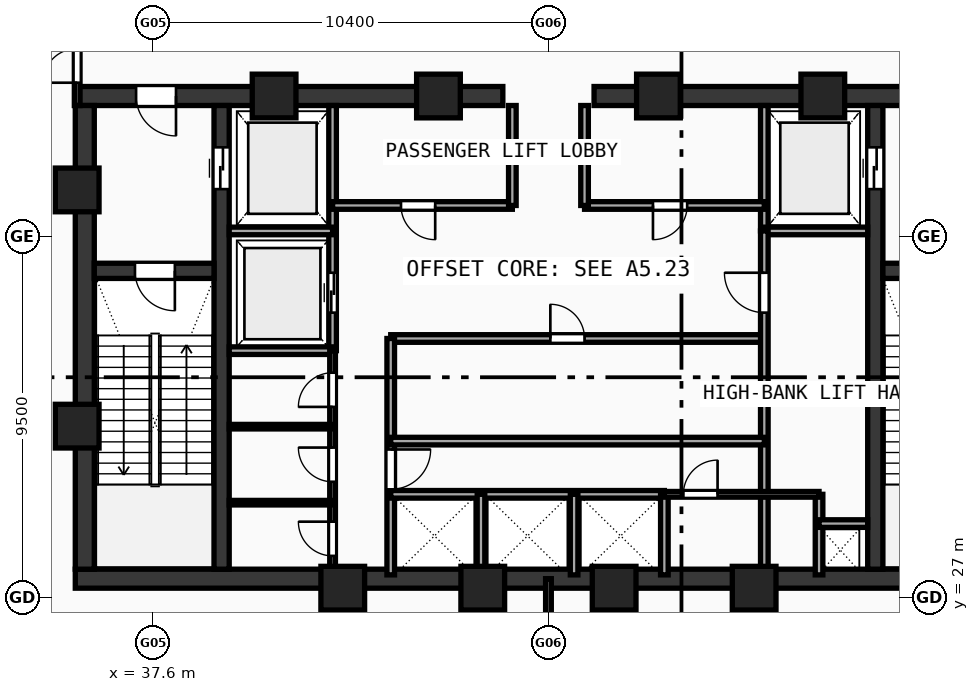
"""IFC4 building model, lengths in metres.
Left out: names, types, materials, properties, quantities, classifications, styles, units other than length and angle.
Written with IfcOpenShell. Run it as: python <this file> out.ifc"""

import sys

from ifc_helpers import new_model, si_unit, direction, frame, frame_2d, origin, origin_with_axes, origin_2d, place, context, subcontext, project, spatial, rectangle, hollow_rectangle, extrude, source, transform, mapped, element, fill, save


model = new_model("IFC4")
c1 = context("Model", 3, precision=1e-05, world=origin(), true_north=direction((0.0, 1.0)))
c2 = subcontext(c1, "Body", "Model", "MODEL_VIEW")
j1 = project(units=[si_unit("LENGTHUNIT", "METRE"), si_unit("PLANEANGLEUNIT", "RADIAN")], contexts=[c1])
p1 = place(None, origin())
s1 = spatial("IfcSite", under=j1, at=p1, CompositionType="ELEMENT")
p2 = place(p1, origin())
s2 = spatial("IfcBuilding", under=s1, at=p2, CompositionType="ELEMENT")
p3 = place(p2, frame((0.0, 0.0, 371.76)))
s3 = spatial("IfcBuildingStorey", under=s2, at=p3, CompositionType="ELEMENT", Elevation=371.76)
p4 = place(p3, frame((35.55, 27.5, 0.0), z_axis=(0.0, 0.0, 1.0), x_axis=(1.0, 0.0, 0.0)))
e1 = element("IfcWall", 1, at=p4, inside=s3, PredefinedType="SHEAR", context=c2, shape_type="SweptSolid", body=[
    extrude(rectangle(XDim=24.9, YDim=0.5, at=frame_2d((12.45, 0.0))), origin(), (0.0, 0.0, 1.0), 4.72),
])
p5 = place(p3, frame((35.55, 40.2, 0.0), z_axis=(0.0, 0.0, 1.0), x_axis=(1.0, 0.0, 0.0)))
e2 = element("IfcWall", 2, at=p5, inside=s3, PredefinedType="SHEAR", context=c2, shape_type="SweptSolid", body=[
    extrude(rectangle(XDim=11.25, YDim=0.5, at=frame_2d((5.625, 0.0))), origin(), (0.0, 0.0, 1.0), 4.72),
])
p6 = place(p5, frame((1.6, 0.0, 0.0)))
e3 = element("IfcOpeningElement", 3, at=p6, cuts=e2, PredefinedType="OPENING", context=c2, shape_type="SweptSolid", body=[
    extrude(rectangle(XDim=1.05, YDim=2.1, at=frame_2d((0.525, 1.05))), frame((0.0, 0.26, 0.0), z_axis=(0.0, -1.0, 0.0), x_axis=(1.0, 0.0, 0.0)), (0.0, 0.0, 1.0), 0.52),
])
p7 = place(p3, frame((49.2, 40.2, 0.0), z_axis=(0.0, 0.0, 1.0), x_axis=(1.0, 0.0, 0.0)))
e4 = element("IfcWall", 4, at=p7, inside=s3, PredefinedType="SHEAR", context=c2, shape_type="SweptSolid", body=[
    extrude(rectangle(XDim=11.25, YDim=0.5, at=frame_2d((5.625, 0.0))), origin(), (0.0, 0.0, 1.0), 4.72),
])
p8 = place(p7, frame((8.6, 0.0, 0.0)))
e5 = element("IfcOpeningElement", 5, at=p8, cuts=e4, PredefinedType="OPENING", context=c2, shape_type="SweptSolid", body=[
    extrude(rectangle(XDim=1.05, YDim=2.1, at=frame_2d((0.525, 1.05))), frame((0.0, 0.26, 0.0), z_axis=(0.0, -1.0, 0.0), x_axis=(1.0, 0.0, 0.0)), (0.0, 0.0, 1.0), 0.52),
])
p9 = place(p3, frame((35.8, 27.75, 0.0), z_axis=(0.0, 0.0, 1.0), x_axis=(0.0, 1.0, 0.0)))
e6 = element("IfcWall", 6, at=p9, inside=s3, PredefinedType="SHEAR", context=c2, shape_type="SweptSolid", body=[
    extrude(rectangle(XDim=12.2, YDim=0.5, at=frame_2d((6.1, 0.0))), origin(), (0.0, 0.0, 1.0), 4.72),
])
p10 = place(p3, frame((39.4, 27.75, 0.0), z_axis=(0.0, 0.0, 1.0), x_axis=(0.0, 1.0, 0.0)))
e7 = element("IfcWall", 7, at=p10, inside=s3, PredefinedType="SHEAR", context=c2, shape_type="SweptSolid", body=[
    extrude(rectangle(XDim=12.2, YDim=0.4, at=frame_2d((6.1, 0.0))), origin(), (0.0, 0.0, 1.0), 4.72),
])
p11 = place(p10, frame((10.0, 0.0, 0.0)))
e8 = element("IfcOpeningElement", 8, at=p11, cuts=e7, PredefinedType="OPENING", context=c2, shape_type="SweptSolid", body=[
    extrude(rectangle(XDim=1.1, YDim=2.1, at=frame_2d((0.55, 1.05))), frame((0.0, 0.21, 0.0), z_axis=(0.0, -1.0, 0.0), x_axis=(1.0, 0.0, 0.0)), (0.0, 0.0, 1.0), 0.42),
])
p12 = place(p3, frame((56.6, 27.75, 0.0), z_axis=(0.0, 0.0, 1.0), x_axis=(0.0, 1.0, 0.0)))
e9 = element("IfcWall", 9, at=p12, inside=s3, PredefinedType="SHEAR", context=c2, shape_type="SweptSolid", body=[
    extrude(rectangle(XDim=12.2, YDim=0.4, at=frame_2d((6.1, 0.0))), origin(), (0.0, 0.0, 1.0), 4.72),
])
p13 = place(p12, frame((10.0, 0.0, 0.0)))
e10 = element("IfcOpeningElement", 10, at=p13, cuts=e9, PredefinedType="OPENING", context=c2, shape_type="SweptSolid", body=[
    extrude(rectangle(XDim=1.1, YDim=2.1, at=frame_2d((0.55, 1.05))), frame((0.0, 0.21, 0.0), z_axis=(0.0, -1.0, 0.0), x_axis=(1.0, 0.0, 0.0)), (0.0, 0.0, 1.0), 0.42),
])
p14 = place(p3, frame((36.05, 35.6, 0.0), z_axis=(0.0, 0.0, 1.0), x_axis=(1.0, 0.0, 0.0)))
e11 = element("IfcWall", 11, at=p14, inside=s3, PredefinedType="SHEAR", context=c2, shape_type="SweptSolid", body=[
    extrude(rectangle(XDim=3.15, YDim=0.4, at=frame_2d((1.575, 0.0))), origin(), (0.0, 0.0, 1.0), 4.72),
])
p15 = place(p14, frame((1.07, 0.0, 0.0)))
e12 = element("IfcOpeningElement", 12, at=p15, cuts=e11, PredefinedType="OPENING", context=c2, shape_type="SweptSolid", body=[
    extrude(rectangle(XDim=1.05, YDim=2.1, at=frame_2d((0.525, 1.05))), frame((0.0, 0.21, 0.0), z_axis=(0.0, -1.0, 0.0), x_axis=(1.0, 0.0, 0.0)), (0.0, 0.0, 1.0), 0.42),
])
p16 = place(p3, frame((56.8, 35.6, 0.0), z_axis=(0.0, 0.0, 1.0), x_axis=(1.0, 0.0, 0.0)))
e13 = element("IfcWall", 13, at=p16, inside=s3, PredefinedType="SHEAR", context=c2, shape_type="SweptSolid", body=[
    extrude(rectangle(XDim=3.15, YDim=0.4, at=frame_2d((1.575, 0.0))), origin(), (0.0, 0.0, 1.0), 4.72),
])
p17 = place(p16, frame((1.02, 0.0, 0.0)))
e14 = element("IfcOpeningElement", 14, at=p17, cuts=e13, PredefinedType="OPENING", context=c2, shape_type="SweptSolid", body=[
    extrude(rectangle(XDim=1.05, YDim=2.1, at=frame_2d((0.525, 1.05))), frame((0.0, 0.21, 0.0), z_axis=(0.0, -1.0, 0.0), x_axis=(1.0, 0.0, 0.0)), (0.0, 0.0, 1.0), 0.42),
])
m1 = source(origin(), c2, "Body", "SweptSolid", [
    extrude(hollow_rectangle(XDim=1.15, YDim=1.15, WallThickness=0.048, at=origin_2d()), origin(), (0.0, 0.0, 1.0), 5.0),
])
for number, where, z_axis, x_axis in (
    (15, (42.588, 27.25, -0.28), (0.0, 0.0, 1.0), (1.0, 0.0, 0.0)),
    (16, (46.272, 27.25, -0.28), (0.0, 0.0, 1.0), (1.0, 0.0, 0.0)),
    (17, (49.729, 27.25, -0.28), (0.0, 0.0, 1.0), (1.0, 0.0, 0.0)),
    (18, (53.412, 27.25, -0.28), (0.0, 0.0, 1.0), (1.0, 0.0, 0.0)),
    (19, (55.219, 40.2, -0.28), (0.0, 0.0, 1.0), (1.0, 0.0, 0.0)),
    (20, (50.894, 40.2, -0.28), (0.0, 0.0, 1.0), (1.0, 0.0, 0.0)),
    (21, (45.106, 40.2, -0.28), (0.0, 0.0, 1.0), (1.0, 0.0, 0.0)),
    (22, (40.781, 40.2, -0.28), (0.0, 0.0, 1.0), (1.0, 0.0, 0.0)),
    (23, (35.6, 37.729, -0.28), (0.0, 0.0, 1.0), (1.0, 0.0, 0.0)),
    (24, (35.6, 31.513, -0.28), (0.0, 0.0, 1.0), (1.0, 0.0, 0.0)),
):
    element("IfcColumn", number, at=place(p3, frame(where, z_axis=z_axis, x_axis=x_axis)), inside=s3, PredefinedType="COLUMN", context=c2, shape_type="MappedRepresentation", body=[
        mapped(m1, transform((0.0, 0.0, 0.0), scale=1.0)),
    ])
p18 = place(p3, frame((42.32, 33.5, 0.0), z_axis=(0.0, 0.0, 1.0), x_axis=(0.0, 1.0, 0.0)))
e25 = element("IfcWall", 25, at=p18, inside=s3, PredefinedType="SOLIDWALL", context=c2, shape_type="SweptSolid", body=[
    extrude(rectangle(XDim=6.45, YDim=0.2, at=frame_2d((3.225, 0.0))), origin(), (0.0, 0.0, 1.0), 4.72),
])
p19 = place(p18, frame((1.0, 0.0, 0.0)))
e26 = element("IfcOpeningElement", 26, at=p19, cuts=e25, PredefinedType="OPENING", context=c2, shape_type="SweptSolid", body=[
    extrude(rectangle(XDim=1.05, YDim=2.1, at=frame_2d((0.525, 1.05))), frame((0.0, 0.11, 0.0), z_axis=(0.0, -1.0, 0.0), x_axis=(1.0, 0.0, 0.0)), (0.0, 0.0, 1.0), 0.22),
])
for number, where, z_axis, x_axis in (
    (27, (39.6, 36.65, 0.0), (0.0, 0.0, 1.0), (1.0, 0.0, 0.0)),
    (28, (39.6, 33.5, 0.0), (0.0, 0.0, 1.0), (1.0, 0.0, 0.0)),
):
    element("IfcWall", number, at=place(p3, frame(where, z_axis=z_axis, x_axis=x_axis)), inside=s3, PredefinedType="SOLIDWALL", context=c2, shape_type="SweptSolid", body=[
        extrude(rectangle(XDim=2.72, YDim=0.2, at=frame_2d((1.36, 0.0))), origin(), (0.0, 0.0, 1.0), 4.72),
    ])
p20 = place(p3, frame((53.68, 36.65, 0.0), z_axis=(0.0, 0.0, 1.0), x_axis=(0.0, 1.0, 0.0)))
e29 = element("IfcWall", 29, at=p20, inside=s3, PredefinedType="SOLIDWALL", context=c2, shape_type="SweptSolid", body=[
    extrude(rectangle(XDim=3.3, YDim=0.2, at=frame_2d((1.65, 0.0))), origin(), (0.0, 0.0, 1.0), 4.72),
])
p21 = place(p3, frame((53.68, 36.65, 0.0), z_axis=(0.0, 0.0, 1.0), x_axis=(1.0, 0.0, 0.0)))
e30 = element("IfcWall", 30, at=p21, inside=s3, PredefinedType="SOLIDWALL", context=c2, shape_type="SweptSolid", body=[
    extrude(rectangle(XDim=2.72, YDim=0.2, at=frame_2d((1.36, 0.0))), origin(), (0.0, 0.0, 1.0), 4.72),
])
p22 = place(p3, frame((42.32, 37.32, 0.0), z_axis=(0.0, 0.0, 1.0), x_axis=(1.0, 0.0, 0.0)))
e31 = element("IfcWall", 31, at=p22, inside=s3, PredefinedType="SOLIDWALL", context=c2, shape_type="SweptSolid", body=[
    extrude(rectangle(XDim=4.73, YDim=0.2, at=frame_2d((2.365, 0.0))), origin(), (0.0, 0.0, 1.0), 4.72),
])
p23 = place(p22, frame((1.8, 0.0, 0.0)))
e32 = element("IfcOpeningElement", 32, at=p23, cuts=e31, PredefinedType="OPENING", context=c2, shape_type="SweptSolid", body=[
    extrude(rectangle(XDim=0.9, YDim=2.1, at=frame_2d((0.45, 1.05))), frame((0.0, 0.11, 0.0), z_axis=(0.0, -1.0, 0.0), x_axis=(1.0, 0.0, 0.0)), (0.0, 0.0, 1.0), 0.22),
])
p24 = place(p3, frame((48.95, 37.32, 0.0), z_axis=(0.0, 0.0, 1.0), x_axis=(1.0, 0.0, 0.0)))
e33 = element("IfcWall", 33, at=p24, inside=s3, PredefinedType="SOLIDWALL", context=c2, shape_type="SweptSolid", body=[
    extrude(rectangle(XDim=4.73, YDim=0.2, at=frame_2d((2.365, 0.0))), origin(), (0.0, 0.0, 1.0), 4.72),
])
p25 = place(p24, frame((1.8, 0.0, 0.0)))
e34 = element("IfcOpeningElement", 34, at=p25, cuts=e33, PredefinedType="OPENING", context=c2, shape_type="SweptSolid", body=[
    extrude(rectangle(XDim=0.9, YDim=2.1, at=frame_2d((0.45, 1.05))), frame((0.0, 0.11, 0.0), z_axis=(0.0, -1.0, 0.0), x_axis=(1.0, 0.0, 0.0)), (0.0, 0.0, 1.0), 0.22),
])
for number, where, z_axis, x_axis in (
    (35, (47.05, 37.32, 0.0), (0.0, 0.0, 1.0), (0.0, 1.0, 0.0)),
    (36, (48.95, 37.32, 0.0), (0.0, 0.0, 1.0), (0.0, 1.0, 0.0)),
):
    element("IfcWall", number, at=place(p3, frame(where, z_axis=z_axis, x_axis=x_axis)), inside=s3, PredefinedType="SOLIDWALL", context=c2, shape_type="SweptSolid", body=[
        extrude(rectangle(XDim=2.63, YDim=0.2, at=frame_2d((1.315, 0.0))), origin(), (0.0, 0.0, 1.0), 4.72),
    ])
p26 = place(p3, frame((43.85, 33.82, 0.0), z_axis=(0.0, 0.0, 1.0), x_axis=(1.0, 0.0, 0.0)))
e37 = element("IfcWall", 37, at=p26, inside=s3, PredefinedType="SOLIDWALL", context=c2, shape_type="SweptSolid", body=[
    extrude(rectangle(XDim=9.83, YDim=0.2, at=frame_2d((4.915, 0.0))), origin(), (0.0, 0.0, 1.0), 4.72),
])
p27 = place(p26, frame((4.2, 0.0, 0.0)))
e38 = element("IfcOpeningElement", 38, at=p27, cuts=e37, PredefinedType="OPENING", context=c2, shape_type="SweptSolid", body=[
    extrude(rectangle(XDim=0.9, YDim=2.1, at=frame_2d((0.45, 1.05))), frame((0.0, 0.11, 0.0), z_axis=(0.0, -1.0, 0.0), x_axis=(1.0, 0.0, 0.0)), (0.0, 0.0, 1.0), 0.22),
])
p28 = place(p3, frame((43.85, 27.6, 0.0), z_axis=(0.0, 0.0, 1.0), x_axis=(0.0, 1.0, 0.0)))
e39 = element("IfcWall", 39, at=p28, inside=s3, PredefinedType="SOLIDWALL", context=c2, shape_type="SweptSolid", body=[
    extrude(rectangle(XDim=6.22, YDim=0.2, at=frame_2d((3.11, 0.0))), origin(), (0.0, 0.0, 1.0), 4.72),
])
p29 = place(p28, frame((2.25, 0.0, 0.0)))
e40 = element("IfcOpeningElement", 40, at=p29, cuts=e39, PredefinedType="OPENING", context=c2, shape_type="SweptSolid", body=[
    extrude(rectangle(XDim=1.05, YDim=2.1, at=frame_2d((0.525, 1.05))), frame((0.0, 0.11, 0.0), z_axis=(0.0, -1.0, 0.0), x_axis=(1.0, 0.0, 0.0)), (0.0, 0.0, 1.0), 0.22),
])
p30 = place(p3, frame((53.68, 27.6, 0.0), z_axis=(0.0, 0.0, 1.0), x_axis=(0.0, 1.0, 0.0)))
e41 = element("IfcWall", 41, at=p30, inside=s3, PredefinedType="SOLIDWALL", context=c2, shape_type="SweptSolid", body=[
    extrude(rectangle(XDim=9.05, YDim=0.2, at=frame_2d((4.525, 0.0))), origin(), (0.0, 0.0, 1.0), 4.72),
])
p31 = place(p30, frame((6.9, 0.0, 0.0)))
e42 = element("IfcOpeningElement", 42, at=p31, cuts=e41, PredefinedType="OPENING", context=c2, shape_type="SweptSolid", body=[
    extrude(rectangle(XDim=1.05, YDim=2.1, at=frame_2d((0.525, 1.05))), frame((0.0, 0.11, 0.0), z_axis=(0.0, -1.0, 0.0), x_axis=(1.0, 0.0, 0.0)), (0.0, 0.0, 1.0), 0.22),
])
p32 = place(p3, frame((43.85, 29.72, 0.0), z_axis=(0.0, 0.0, 1.0), x_axis=(1.0, 0.0, 0.0)))
e43 = element("IfcWall", 43, at=p32, inside=s3, PredefinedType="SOLIDWALL", context=c2, shape_type="SweptSolid", body=[
    extrude(rectangle(XDim=7.2, YDim=0.2, at=frame_2d((3.6, 0.0))), origin(), (0.0, 0.0, 1.0), 4.72),
])
p33 = place(p3, frame((51.05, 27.6, 0.0), z_axis=(0.0, 0.0, 1.0), x_axis=(0.0, 1.0, 0.0)))
e44 = element("IfcWall", 44, at=p33, inside=s3, PredefinedType="SOLIDWALL", context=c2, shape_type="SweptSolid", body=[
    extrude(rectangle(XDim=2.12, YDim=0.2, at=frame_2d((1.06, 0.0))), origin(), (0.0, 0.0, 1.0), 4.72),
])
p34 = place(p3, frame((43.85, 31.12, 0.0), z_axis=(0.0, 0.0, 1.0), x_axis=(1.0, 0.0, 0.0)))
e45 = element("IfcWall", 45, at=p34, inside=s3, PredefinedType="SOLIDWALL", context=c2, shape_type="SweptSolid", body=[
    extrude(rectangle(XDim=9.83, YDim=0.2, at=frame_2d((4.915, 0.0))), origin(), (0.0, 0.0, 1.0), 4.72),
])
for number, where, z_axis, x_axis in (
    (46, (46.225, 27.6, 0.0), (0.0, 0.0, 1.0), (0.0, 1.0, 0.0)),
    (47, (48.675, 27.6, 0.0), (0.0, 0.0, 1.0), (0.0, 1.0, 0.0)),
    (48, (55.12, 27.6, 0.0), (0.0, 0.0, 1.0), (0.0, 1.0, 0.0)),
):
    element("IfcWall", number, at=place(p3, frame(where, z_axis=z_axis, x_axis=x_axis)), inside=s3, PredefinedType="SOLIDWALL", context=c2, shape_type="SweptSolid", body=[
        extrude(rectangle(XDim=2.12, YDim=0.2, at=frame_2d((1.06, 0.0))), origin(), (0.0, 0.0, 1.0), 4.72),
    ])
p35 = place(p3, frame((55.12, 28.95, 0.0), z_axis=(0.0, 0.0, 1.0), x_axis=(1.0, 0.0, 0.0)))
e49 = element("IfcWall", 49, at=p35, inside=s3, PredefinedType="SOLIDWALL", context=c2, shape_type="SweptSolid", body=[
    extrude(rectangle(XDim=1.28, YDim=0.2, at=frame_2d((0.64, 0.0))), origin(), (0.0, 0.0, 1.0), 4.72),
])
p36 = place(p3, frame((42.32, 27.6, 0.0), z_axis=(0.0, 0.0, 1.0), x_axis=(0.0, 1.0, 0.0)))
e50 = element("IfcWall", 50, at=p36, inside=s3, PredefinedType="PARTITIONING", context=c2, shape_type="SweptSolid", body=[
    extrude(rectangle(XDim=5.9, YDim=0.15, at=frame_2d((2.95, 0.0))), origin(), (0.0, 0.0, 1.0), 4.72),
])
p37 = place(p36, frame((0.5, 0.0, 0.0)))
e51 = element("IfcOpeningElement", 51, at=p37, cuts=e50, PredefinedType="OPENING", context=c2, shape_type="SweptSolid", body=[
    extrude(rectangle(XDim=0.9, YDim=2.1, at=frame_2d((0.45, 1.05))), frame((0.0, 0.085, 0.0), z_axis=(0.0, -1.0, 0.0), x_axis=(1.0, 0.0, 0.0)), (0.0, 0.0, 1.0), 0.17),
])
p38 = place(p36, frame((2.45, 0.0, 0.0)))
e52 = element("IfcOpeningElement", 52, at=p38, cuts=e50, PredefinedType="OPENING", context=c2, shape_type="SweptSolid", body=[
    extrude(rectangle(XDim=0.9, YDim=2.1, at=frame_2d((0.45, 1.05))), frame((0.0, 0.085, 0.0), z_axis=(0.0, -1.0, 0.0), x_axis=(1.0, 0.0, 0.0)), (0.0, 0.0, 1.0), 0.17),
])
p39 = place(p36, frame((4.42, 0.0, 0.0)))
e53 = element("IfcOpeningElement", 53, at=p39, cuts=e50, PredefinedType="OPENING", context=c2, shape_type="SweptSolid", body=[
    extrude(rectangle(XDim=0.9, YDim=2.1, at=frame_2d((0.45, 1.05))), frame((0.0, 0.085, 0.0), z_axis=(0.0, -1.0, 0.0), x_axis=(1.0, 0.0, 0.0)), (0.0, 0.0, 1.0), 0.17),
])
p40 = place(p3, frame((51.05, 29.72, 0.0), z_axis=(0.0, 0.0, 1.0), x_axis=(1.0, 0.0, 0.0)))
e54 = element("IfcWall", 54, at=p40, inside=s3, PredefinedType="PARTITIONING", context=c2, shape_type="SweptSolid", body=[
    extrude(rectangle(XDim=4.07, YDim=0.15, at=frame_2d((2.035, 0.0))), origin(), (0.0, 0.0, 1.0), 4.72),
])
p41 = place(p40, frame((0.5, 0.0, 0.0)))
e55 = element("IfcOpeningElement", 55, at=p41, cuts=e54, PredefinedType="OPENING", context=c2, shape_type="SweptSolid", body=[
    extrude(rectangle(XDim=0.9, YDim=2.1, at=frame_2d((0.45, 1.05))), frame((0.0, 0.085, 0.0), z_axis=(0.0, -1.0, 0.0), x_axis=(1.0, 0.0, 0.0)), (0.0, 0.0, 1.0), 0.17),
])
for number, where, z_axis, x_axis in (
    (56, (39.6, 29.5, 0.0), (0.0, 0.0, 1.0), (1.0, 0.0, 0.0)),
    (57, (39.6, 31.5, 0.0), (0.0, 0.0, 1.0), (1.0, 0.0, 0.0)),
):
    element("IfcWall", number, at=place(p3, frame(where, z_axis=z_axis, x_axis=x_axis)), inside=s3, PredefinedType="PARTITIONING", context=c2, shape_type="SweptSolid", body=[
        extrude(rectangle(XDim=2.72, YDim=0.12, at=frame_2d((1.36, 0.0))), origin(), (0.0, 0.0, 1.0), 4.72),
    ])
p42 = place(p3, frame((35.6, 39.95, 0.0), z_axis=(0.0, 0.0, 1.0), x_axis=(0.0, 1.0, 0.0)))
e58 = element("IfcWall", 58, at=p42, inside=s3, PredefinedType="PARTITIONING", context=c2, shape_type="SweptSolid", body=[
    extrude(rectangle(XDim=2.17, YDim=0.15, at=frame_2d((1.085, 0.0))), origin(), (0.0, 0.0, 1.0), 4.37),
])
p43 = place(p42, frame((0.6, 0.0, 0.0)))
e59 = element("IfcOpeningElement", 59, at=p43, cuts=e58, PredefinedType="OPENING", context=c2, shape_type="SweptSolid", body=[
    extrude(rectangle(XDim=0.9, YDim=2.1, at=frame_2d((0.45, 1.05))), frame((0.0, 0.085, 0.0), z_axis=(0.0, -1.0, 0.0), x_axis=(1.0, 0.0, 0.0)), (0.0, 0.0, 1.0), 0.17),
])
p44 = place(p3, frame((48.0, 23.314, 0.0), z_axis=(0.0, 0.0, 1.0), x_axis=(0.0, 1.0, 0.0)))
e60 = element("IfcWall", 60, at=p44, inside=s3, PredefinedType="PARTITIONING", context=c2, shape_type="SweptSolid", body=[
    extrude(rectangle(XDim=4.186, YDim=0.15, at=frame_2d((2.093, 0.0))), origin(), (0.0, 0.0, 1.0), 4.12),
])
m2 = source(origin(), c2, "Body", "SweptSolid", [
    extrude(rectangle(XDim=1.05, YDim=2.1, at=frame_2d((0.525, 1.05))), frame((0.0, 0.025, 0.0), z_axis=(0.0, -1.0, 0.0), x_axis=(1.0, 0.0, 0.0)), (0.0, 0.0, 1.0), 0.05),
])
p45 = place(p15, frame((1.05, 0.0, 0.0), z_axis=(0.0, 0.0, 1.0), x_axis=(-1.0, 0.0, 0.0)))
e61 = element("IfcDoor", 61, at=p45, inside=s3, OperationType="SINGLE_SWING_LEFT", PredefinedType="DOOR", context=c2, shape_type="MappedRepresentation", body=[
    mapped(m2, transform((0.0, 0.0, 0.0), scale=1.0)),
])
fill(e12, e61)
p46 = place(p6, frame((1.05, 0.0, 0.0), z_axis=(0.0, 0.0, 1.0), x_axis=(-1.0, 0.0, 0.0)))
e62 = element("IfcDoor", 62, at=p46, inside=s3, OperationType="SINGLE_SWING_LEFT", PredefinedType="DOOR", context=c2, shape_type="MappedRepresentation", body=[
    mapped(m2, transform((0.0, 0.0, 0.0), scale=1.0)),
])
fill(e3, e62)
m3 = source(origin(), c2, "Body", "SweptSolid", [
    extrude(rectangle(XDim=1.1, YDim=2.1, at=frame_2d((0.55, 1.05))), frame((0.0, 0.025, 0.0), z_axis=(0.0, -1.0, 0.0), x_axis=(1.0, 0.0, 0.0)), (0.0, 0.0, 1.0), 0.05),
])
p47 = place(p11, frame((1.1, 0.0, 0.0), z_axis=(0.0, 0.0, 1.0), x_axis=(-1.0, 0.0, 0.0)))
e63 = element("IfcDoor", 63, at=p47, inside=s3, OperationType="DOUBLE_DOOR_SLIDING", PredefinedType="DOOR", context=c2, shape_type="MappedRepresentation", body=[
    mapped(m3, transform((0.0, 0.0, 0.0), scale=1.0)),
])
fill(e8, e63)
p48 = place(p13, origin_with_axes())
e64 = element("IfcDoor", 64, at=p48, inside=s3, OperationType="DOUBLE_DOOR_SLIDING", PredefinedType="DOOR", context=c2, shape_type="MappedRepresentation", body=[
    mapped(m3, transform((0.0, 0.0, 0.0), scale=1.0)),
])
fill(e10, e64)
p49 = place(p19, origin_with_axes())
e65 = element("IfcDoor", 65, at=p49, inside=s3, OperationType="DOUBLE_DOOR_SLIDING", PredefinedType="DOOR", context=c2, shape_type="MappedRepresentation", body=[
    mapped(m2, transform((0.0, 0.0, 0.0), scale=1.0)),
])
fill(e26, e65)
m4 = source(origin(), c2, "Body", "SweptSolid", [
    extrude(rectangle(XDim=0.9, YDim=2.1, at=frame_2d((0.45, 1.05))), frame((0.0, 0.025, 0.0), z_axis=(0.0, -1.0, 0.0), x_axis=(1.0, 0.0, 0.0)), (0.0, 0.0, 1.0), 0.05),
])
p50 = place(p23, frame((0.9, 0.0, 0.0), z_axis=(0.0, 0.0, 1.0), x_axis=(-1.0, 0.0, 0.0)))
e66 = element("IfcDoor", 66, at=p50, inside=s3, OperationType="SINGLE_SWING_LEFT", PredefinedType="DOOR", context=c2, shape_type="MappedRepresentation", body=[
    mapped(m4, transform((0.0, 0.0, 0.0), scale=1.0)),
])
fill(e32, e66)
p51 = place(p25, frame((0.9, 0.0, 0.0), z_axis=(0.0, 0.0, 1.0), x_axis=(-1.0, 0.0, 0.0)))
e67 = element("IfcDoor", 67, at=p51, inside=s3, OperationType="SINGLE_SWING_RIGHT", PredefinedType="DOOR", context=c2, shape_type="MappedRepresentation", body=[
    mapped(m4, transform((0.0, 0.0, 0.0), scale=1.0)),
])
fill(e34, e67)
p52 = place(p27, origin_with_axes())
e68 = element("IfcDoor", 68, at=p52, inside=s3, OperationType="SINGLE_SWING_LEFT", PredefinedType="DOOR", context=c2, shape_type="MappedRepresentation", body=[
    mapped(m4, transform((0.0, 0.0, 0.0), scale=1.0)),
])
fill(e38, e68)
p53 = place(p29, frame((1.05, 0.0, 0.0), z_axis=(0.0, 0.0, 1.0), x_axis=(-1.0, 0.0, 0.0)))
e69 = element("IfcDoor", 69, at=p53, inside=s3, OperationType="SINGLE_SWING_LEFT", PredefinedType="DOOR", context=c2, shape_type="MappedRepresentation", body=[
    mapped(m2, transform((0.0, 0.0, 0.0), scale=1.0)),
])
fill(e40, e69)
p54 = place(p31, origin_with_axes())
e70 = element("IfcDoor", 70, at=p54, inside=s3, OperationType="SINGLE_SWING_RIGHT", PredefinedType="DOOR", context=c2, shape_type="MappedRepresentation", body=[
    mapped(m2, transform((0.0, 0.0, 0.0), scale=1.0)),
])
fill(e42, e70)
p55 = place(p37, origin_with_axes())
e71 = element("IfcDoor", 71, at=p55, inside=s3, OperationType="SINGLE_SWING_RIGHT", PredefinedType="DOOR", context=c2, shape_type="MappedRepresentation", body=[
    mapped(m4, transform((0.0, 0.0, 0.0), scale=1.0)),
])
fill(e51, e71)
p56 = place(p38, origin_with_axes())
e72 = element("IfcDoor", 72, at=p56, inside=s3, OperationType="SINGLE_SWING_RIGHT", PredefinedType="DOOR", context=c2, shape_type="MappedRepresentation", body=[
    mapped(m4, transform((0.0, 0.0, 0.0), scale=1.0)),
])
fill(e52, e72)
p57 = place(p39, origin_with_axes())
e73 = element("IfcDoor", 73, at=p57, inside=s3, OperationType="SINGLE_SWING_LEFT", PredefinedType="DOOR", context=c2, shape_type="MappedRepresentation", body=[
    mapped(m4, transform((0.0, 0.0, 0.0), scale=1.0)),
])
fill(e53, e73)
p58 = place(p41, origin_with_axes())
e74 = element("IfcDoor", 74, at=p58, inside=s3, OperationType="SINGLE_SWING_RIGHT", PredefinedType="DOOR", context=c2, shape_type="MappedRepresentation", body=[
    mapped(m4, transform((0.0, 0.0, 0.0), scale=1.0)),
])
fill(e55, e74)
p59 = place(p43, origin_with_axes())
e75 = element("IfcDoor", 75, at=p59, inside=s3, OperationType="SINGLE_SWING_LEFT", PredefinedType="DOOR", context=c2, shape_type="MappedRepresentation", body=[
    mapped(m4, transform((0.0, 0.0, 0.0), scale=1.0)),
])
fill(e59, e75)
save(model, sys.argv[1])
